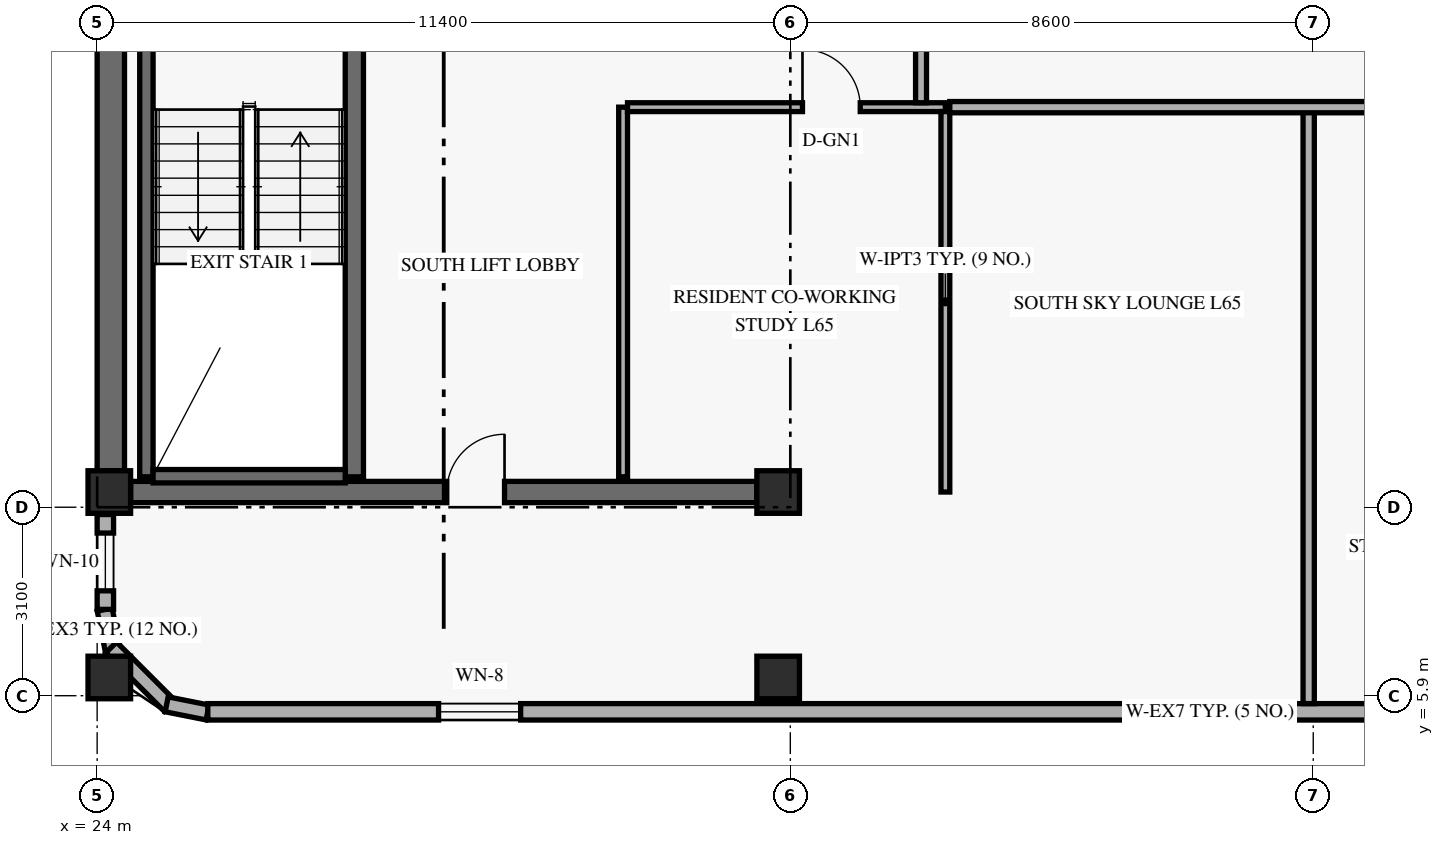
"""IFC4 building model, lengths in metres.
Left out: names, types, materials, properties, quantities, classifications, styles, units other than length and angle.
Written with IfcOpenShell. Run it as: python <this file> out.ifc"""

import sys

from ifc_helpers import new_model, si_unit, direction, frame, frame_2d, origin, origin_2d, place, context, subcontext, project, spatial, rectangle, extrude, element, fill, save


model = new_model("IFC4")
c1 = context("Model", 3, precision=1e-05, world=origin(), true_north=direction((0.0, 1.0)))
c2 = subcontext(c1, "Body", "Model", "MODEL_VIEW")
j1 = project(units=[si_unit("LENGTHUNIT", "METRE"), si_unit("PLANEANGLEUNIT", "RADIAN")], contexts=[c1])
p1 = place(None, origin())
s1 = spatial("IfcSite", under=j1, at=p1, CompositionType="ELEMENT")
p2 = place(p1, origin())
s2 = spatial("IfcBuilding", under=s1, at=p2, CompositionType="ELEMENT")
p3 = place(p2, frame((0.0, 0.0, 249.6)))
s3 = spatial("IfcBuildingStorey", under=s2, at=p3, CompositionType="ELEMENT", Elevation=249.6)
p4 = place(p3, frame((24.225, 9.6, 0.0), z_axis=(0.0, 0.0, 1.0), x_axis=(0.0, 1.0, 0.0)))
e1 = element("IfcWall", 1, at=p4, inside=s3, PredefinedType="SHEAR", context=c2, shape_type="SweptSolid", body=[
    extrude(rectangle(XDim=7.6, YDim=0.45, at=frame_2d((3.8, 0.0))), origin(), (0.0, 0.0, 1.0), 2.821),
])
p5 = place(p3, frame((24.55, 9.25, 0.0), z_axis=(0.0, 0.0, 1.0), x_axis=(1.0, 0.0, 0.0)))
e2 = element("IfcWall", 2, at=p5, inside=s3, PredefinedType="SHEAR", context=c2, shape_type="SweptSolid", body=[
    extrude(rectangle(XDim=10.3, YDim=0.35, at=frame_2d((5.15, 0.0))), origin(), (0.0, 0.0, 1.0), 3.36),
])
p6 = place(p5, frame((5.2, 0.0, 0.0)))
e3 = element("IfcOpeningElement", 3, at=p6, cuts=e2, PredefinedType="OPENING", context=c2, shape_type="SweptSolid", body=[
    extrude(rectangle(XDim=0.95, YDim=2.15, at=frame_2d((0.475, 1.075))), frame((0.0, 0.185, 0.0), z_axis=(0.0, -1.0, 0.0), x_axis=(1.0, 0.0, 0.0)), (0.0, 0.0, 1.0), 0.37),
])
p7 = place(p3, frame((24.81, 9.5, 0.0), z_axis=(0.0, 0.0, 1.0), x_axis=(0.0, 1.0, 0.0)))
e4 = element("IfcWall", 4, at=p7, inside=s3, PredefinedType="SHEAR", context=c2, shape_type="SweptSolid", body=[
    extrude(rectangle(XDim=7.76, YDim=0.22, at=frame_2d((3.88, 0.0))), origin(), (0.0, 0.0, 1.0), 3.36),
])
p8 = place(p3, frame((28.23, 9.5, 0.0), z_axis=(0.0, 0.0, 1.0), x_axis=(0.0, 1.0, 0.0)))
e5 = element("IfcWall", 5, at=p8, inside=s3, PredefinedType="SHEAR", context=c2, shape_type="SweptSolid", body=[
    extrude(rectangle(XDim=7.76, YDim=0.3, at=frame_2d((3.88, 0.0))), origin(), (0.0, 0.0, 1.0), 3.36),
])
p9 = place(p3, frame((24.92, 9.51, 0.0), z_axis=(0.0, 0.0, 1.0), x_axis=(1.0, 0.0, 0.0)))
e6 = element("IfcWall", 6, at=p9, inside=s3, PredefinedType="SHEAR", context=c2, shape_type="SweptSolid", body=[
    extrude(rectangle(XDim=3.16, YDim=0.22, at=frame_2d((1.58, 0.0))), origin(), (0.0, 0.0, 1.0), 3.36),
])
for number, where, z_axis, x_axis in (
    (7, (24.2, 6.2, 0.0), (0.0, 0.0, 1.0), (1.0, 0.0, 0.0)),
    (8, (24.2, 9.25, 0.0), (0.0, 0.0, 1.0), (1.0, 0.0, 0.0)),
    (9, (35.2, 6.2, 0.0), (0.0, 0.0, 1.0), (1.0, 0.0, 0.0)),
    (10, (35.2, 9.25, 0.0), (0.0, 0.0, 1.0), (1.0, 0.0, 0.0)),
):
    element("IfcColumn", number, at=place(p3, frame(where, z_axis=z_axis, x_axis=x_axis)), inside=s3, PredefinedType="COLUMN", context=c2, shape_type="SweptSolid", body=[
        extrude(rectangle(XDim=0.7, YDim=0.7, at=origin_2d()), origin(), (0.0, 0.0, 1.0), 3.6),
    ])
p10 = place(p3, frame((24.124, 7.316, 0.0), z_axis=(0.0, 0.0, 1.0), x_axis=(0.194952956674, -0.980812594069, 0.0)))
e11 = element("IfcWall", 11, at=p10, inside=s3, PredefinedType="SOLIDWALL", context=c2, shape_type="SweptSolid", body=[
    extrude(rectangle(XDim=0.686, YDim=0.25, at=frame_2d((0.343, 0.0))), origin(), (0.0, 0.0, 1.0), 2.803),
])
p11 = place(p3, frame((24.231, 6.694, 0.0), z_axis=(0.0, 0.0, 1.0), x_axis=(0.707106781187, -0.707106781187, 0.0)))
e12 = element("IfcWall", 12, at=p11, inside=s3, PredefinedType="SOLIDWALL", context=c2, shape_type="SweptSolid", body=[
    extrude(rectangle(XDim=1.362, YDim=0.25, at=frame_2d((0.681, 0.0))), origin(), (0.0, 0.0, 1.0), 2.803),
])
p12 = place(p3, frame((25.143, 5.758, 0.0), z_axis=(0.0, 0.0, 1.0), x_axis=(0.980812594069, -0.194952956674, 0.0)))
e13 = element("IfcWall", 13, at=p12, inside=s3, PredefinedType="SOLIDWALL", context=c2, shape_type="SweptSolid", body=[
    extrude(rectangle(XDim=0.686, YDim=0.25, at=frame_2d((0.343, 0.0))), origin(), (0.0, 0.0, 1.0), 3.36),
])
p13 = place(p3, frame((25.82, 5.635, 0.0), z_axis=(0.0, 0.0, 1.0), x_axis=(1.0, 0.0, 0.0)))
e14 = element("IfcWall", 14, at=p13, inside=s3, PredefinedType="SOLIDWALL", context=c2, shape_type="SweptSolid", body=[
    extrude(rectangle(XDim=32.96, YDim=0.27, at=frame_2d((16.48, 0.0))), origin(), (0.0, 0.0, 1.0), 3.36),
])
p14 = place(p13, frame((3.795, 0.0, 0.85)))
e15 = element("IfcOpeningElement", 15, at=p14, cuts=e14, PredefinedType="OPENING", context=c2, shape_type="SweptSolid", body=[
    extrude(rectangle(XDim=1.35, YDim=1.55, at=frame_2d((0.675, 0.775))), frame((0.0, 0.145, 0.0), z_axis=(0.0, -1.0, 0.0), x_axis=(1.0, 0.0, 0.0)), (0.0, 0.0, 1.0), 0.29),
])
p15 = place(p13, frame((19.615, 0.0, 0.85)))
e16 = element("IfcOpeningElement", 16, at=p15, cuts=e14, PredefinedType="OPENING", context=c2, shape_type="SweptSolid", body=[
    extrude(rectangle(XDim=1.35, YDim=1.55, at=frame_2d((0.675, 0.775))), frame((0.0, 0.145, 0.0), z_axis=(0.0, -1.0, 0.0), x_axis=(1.0, 0.0, 0.0)), (0.0, 0.0, 1.0), 0.29),
])
p16 = place(p13, frame((24.33, 0.0, 0.85)))
e17 = element("IfcOpeningElement", 17, at=p16, cuts=e14, PredefinedType="OPENING", context=c2, shape_type="SweptSolid", body=[
    extrude(rectangle(XDim=1.35, YDim=1.55, at=frame_2d((0.675, 0.775))), frame((0.0, 0.145, 0.0), z_axis=(0.0, -1.0, 0.0), x_axis=(1.0, 0.0, 0.0)), (0.0, 0.0, 1.0), 0.29),
])
p17 = place(p13, frame((27.779, 0.0, 0.85)))
e18 = element("IfcOpeningElement", 18, at=p17, cuts=e14, PredefinedType="OPENING", context=c2, shape_type="SweptSolid", body=[
    extrude(rectangle(XDim=1.35, YDim=1.55, at=frame_2d((0.675, 0.775))), frame((0.0, 0.145, 0.0), z_axis=(0.0, -1.0, 0.0), x_axis=(1.0, 0.0, 0.0)), (0.0, 0.0, 1.0), 0.29),
])
p18 = place(p3, frame((24.135, 7.32, 0.0), z_axis=(0.0, 0.0, 1.0), x_axis=(0.0, 1.0, 0.0)))
e19 = element("IfcWall", 19, at=p18, inside=s3, PredefinedType="SOLIDWALL", context=c2, shape_type="SweptSolid", body=[
    extrude(rectangle(XDim=1.56, YDim=0.27, at=frame_2d((0.78, 0.0))), origin(), (0.0, 0.0, 1.0), 2.803),
])
p19 = place(p18, frame((0.305, 0.0, 0.85)))
e20 = element("IfcOpeningElement", 20, at=p19, cuts=e19, PredefinedType="OPENING", context=c2, shape_type="SweptSolid", body=[
    extrude(rectangle(XDim=0.95, YDim=1.5, at=frame_2d((0.475, 0.75))), frame((0.0, 0.145, 0.0), z_axis=(0.0, -1.0, 0.0), x_axis=(1.0, 0.0, 0.0)), (0.0, 0.0, 1.0), 0.29),
])
p20 = place(p3, frame((32.65, 9.5, 0.0), z_axis=(0.0, 0.0, 1.0), x_axis=(0.0, 1.0, 0.0)))
e21 = element("IfcWall", 21, at=p20, inside=s3, PredefinedType="PARTITIONING", context=c2, shape_type="SweptSolid", body=[
    extrude(rectangle(XDim=6.08, YDim=0.145, at=frame_2d((3.04, 0.0))), origin(), (0.0, 0.0, 1.0), 3.36),
])
p21 = place(p3, frame((32.722, 15.58, 0.0), z_axis=(0.0, 0.0, 1.0), x_axis=(1.0, 0.0, 0.0)))
e22 = element("IfcWall", 22, at=p21, inside=s3, PredefinedType="PARTITIONING", context=c2, shape_type="SweptSolid", body=[
    extrude(rectangle(XDim=5.228, YDim=0.145, at=frame_2d((2.614, 0.0))), origin(), (0.0, 0.0, 1.0), 2.803),
])
p22 = place(p21, frame((2.877, 0.0, 0.0)))
e23 = element("IfcOpeningElement", 23, at=p22, cuts=e22, PredefinedType="OPENING", context=c2, shape_type="SweptSolid", body=[
    extrude(rectangle(XDim=0.95, YDim=2.15, at=frame_2d((0.475, 1.075))), frame((0.0, 0.083, 0.0), z_axis=(0.0, -1.0, 0.0), x_axis=(1.0, 0.0, 0.0)), (0.0, 0.0, 1.0), 0.165),
])
p23 = place(p3, frame((37.95, 9.25, 0.0), z_axis=(0.0, 0.0, 1.0), x_axis=(0.0, 1.0, 0.0)))
e24 = element("IfcWall", 24, at=p23, inside=s3, PredefinedType="PARTITIONING", context=c2, shape_type="SweptSolid", body=[
    extrude(rectangle(XDim=6.258, YDim=0.145, at=frame_2d((3.129, 0.0))), origin(), (0.0, 0.0, 1.0), 2.803),
])
p24 = place(p3, frame((37.55, 15.653, 0.0), z_axis=(0.0, 0.0, 1.0), x_axis=(0.0, 1.0, 0.0)))
e25 = element("IfcWall", 25, at=p24, inside=s3, PredefinedType="STANDARD", context=c2, shape_type="SweptSolid", body=[
    extrude(rectangle(XDim=5.147, YDim=0.18, at=frame_2d((2.574, 0.0))), origin(), (0.0, 0.0, 1.0), 2.803),
])
p25 = place(p3, frame((43.925, 5.77, 0.0), z_axis=(0.0, 0.0, 1.0), x_axis=(0.0, 1.0, 0.0)))
e26 = element("IfcWall", 26, at=p25, inside=s3, PredefinedType="PARTITIONING", context=c2, shape_type="SweptSolid", body=[
    extrude(rectangle(XDim=9.81, YDim=0.185, at=frame_2d((4.905, 0.0))), origin(), (0.0, 0.0, 1.0), 2.803),
])
p26 = place(p3, frame((38.022, 15.58, 0.0), z_axis=(0.0, 0.0, 1.0), x_axis=(1.0, 0.0, 0.0)))
e27 = element("IfcWall", 27, at=p26, inside=s3, PredefinedType="PARTITIONING", context=c2, shape_type="SweptSolid", body=[
    extrude(rectangle(XDim=11.788, YDim=0.185, at=frame_2d((5.894, 0.0))), origin(), (0.0, 0.0, 1.0), 2.803),
])
p27 = place(p14, origin())
e28 = element("IfcWindow", 28, at=p27, inside=s3, PartitioningType="SINGLE_PANEL", PredefinedType="WINDOW", context=c2, shape_type="SweptSolid", body=[
    extrude(rectangle(XDim=1.35, YDim=1.55, at=frame_2d((0.675, 0.775))), frame((0.0, 0.03, 0.0), z_axis=(0.0, -1.0, 0.0), x_axis=(1.0, 0.0, 0.0)), (0.0, 0.0, 1.0), 0.06),
])
fill(e15, e28)
p28 = place(p19, origin())
e29 = element("IfcWindow", 29, at=p28, inside=s3, PartitioningType="SINGLE_PANEL", PredefinedType="WINDOW", context=c2, shape_type="SweptSolid", body=[
    extrude(rectangle(XDim=0.95, YDim=1.5, at=frame_2d((0.475, 0.75))), frame((0.0, 0.03, 0.0), z_axis=(0.0, -1.0, 0.0), x_axis=(1.0, 0.0, 0.0)), (0.0, 0.0, 1.0), 0.06),
])
fill(e20, e29)
p29 = place(p22, origin())
e30 = element("IfcDoor", 30, at=p29, inside=s3, OperationType="SINGLE_SWING_LEFT", PredefinedType="DOOR", context=c2, shape_type="SweptSolid", body=[
    extrude(rectangle(XDim=0.95, YDim=2.15, at=frame_2d((0.475, 1.075))), frame((0.0, 0.025, 0.0), z_axis=(0.0, -1.0, 0.0), x_axis=(1.0, 0.0, 0.0)), (0.0, 0.0, 1.0), 0.05),
])
fill(e23, e30)
p30 = place(p6, frame((0.95, 0.0, 0.0), z_axis=(0.0, 0.0, 1.0), x_axis=(-1.0, 0.0, 0.0)))
e31 = element("IfcDoor", 31, at=p30, inside=s3, OperationType="SINGLE_SWING_LEFT", PredefinedType="DOOR", context=c2, shape_type="SweptSolid", body=[
    extrude(rectangle(XDim=0.95, YDim=2.15, at=frame_2d((0.475, 1.075))), frame((0.0, 0.025, 0.0), z_axis=(0.0, -1.0, 0.0), x_axis=(1.0, 0.0, 0.0)), (0.0, 0.0, 1.0), 0.05),
])
fill(e3, e31)
save(model, sys.argv[1])
